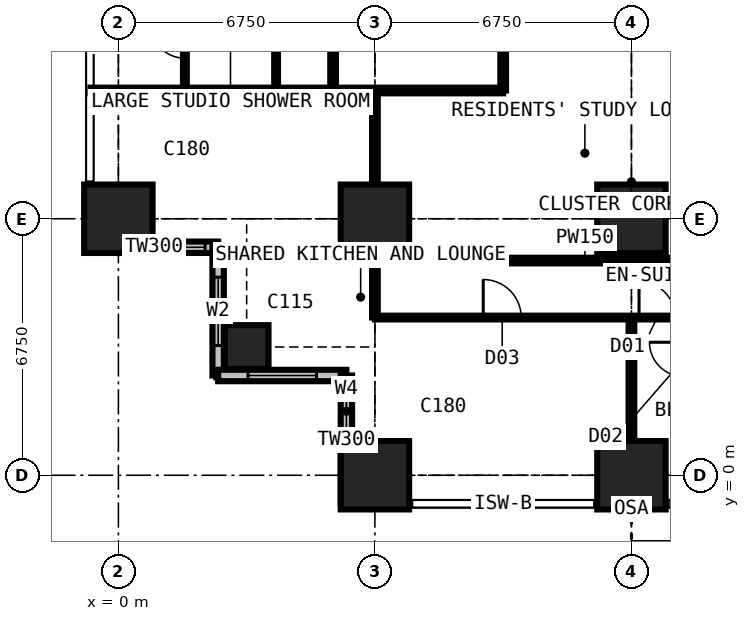
"""IFC4 building model, lengths in metres.
Left out: names, types, materials, properties, quantities, classifications, styles, units other than length and angle.
Written with IfcOpenShell. Run it as: python <this file> out.ifc"""

import sys

from ifc_helpers import new_model, si_unit, direction, frame, frame_2d, origin, origin_2d, place, context, subcontext, project, spatial, rectangle, extrude, element, fill, save


model = new_model("IFC4")
c1 = context("Model", 3, precision=1e-05, world=origin(), true_north=direction((0.0, 1.0)))
c2 = subcontext(c1, "Body", "Model", "MODEL_VIEW")
j1 = project(units=[si_unit("LENGTHUNIT", "METRE"), si_unit("PLANEANGLEUNIT", "RADIAN")], contexts=[c1])
p1 = place(None, origin())
s1 = spatial("IfcSite", under=j1, at=p1, CompositionType="ELEMENT")
p2 = place(p1, origin())
s2 = spatial("IfcBuilding", under=s1, at=p2, CompositionType="ELEMENT")
p3 = place(p2, frame((0.0, 0.0, 90.9)))
s3 = spatial("IfcBuildingStorey", under=s2, at=p3, CompositionType="ELEMENT", Elevation=90.9)
p4 = place(p3, frame((0.0, 6.75, 0.0), z_axis=(0.0, 0.0, 1.0), x_axis=(1.0, 0.0, 0.0)))
e1 = element("IfcColumn", 1, at=p4, inside=s3, PredefinedType="COLUMN", context=c2, shape_type="SweptSolid", body=[
    extrude(rectangle(XDim=1.8, YDim=1.8, at=origin_2d()), origin(), (0.0, 0.0, 1.0), 3.6),
])
p5 = place(p3, frame((3.375, 3.375, 0.0), z_axis=(0.0, 0.0, 1.0), x_axis=(1.0, 0.0, 0.0)))
e2 = element("IfcColumn", 2, at=p5, inside=s3, PredefinedType="COLUMN", context=c2, shape_type="SweptSolid", body=[
    extrude(rectangle(XDim=1.15, YDim=1.15, at=origin_2d()), origin(), (0.0, 0.0, 1.0), 3.6),
])
for number, where, z_axis, x_axis in (
    (3, (6.75, 0.0, 0.0), (0.0, 0.0, 1.0), (1.0, 0.0, 0.0)),
    (4, (6.75, 6.75, 0.0), (0.0, 0.0, 1.0), (1.0, 0.0, 0.0)),
    (5, (13.5, 0.0, 0.0), (0.0, 0.0, 1.0), (1.0, 0.0, 0.0)),
    (6, (13.5, 6.75, 0.0), (0.0, 0.0, 1.0), (1.0, 0.0, 0.0)),
):
    element("IfcColumn", number, at=place(p3, frame(where, z_axis=z_axis, x_axis=x_axis)), inside=s3, PredefinedType="COLUMN", context=c2, shape_type="SweptSolid", body=[
        extrude(rectangle(XDim=1.8, YDim=1.8, at=origin_2d()), origin(), (0.0, 0.0, 1.0), 3.6),
    ])
p6 = place(p3, frame((-0.75, 6.0, 0.0), z_axis=(0.0, 0.0, 1.0), x_axis=(1.0, 0.0, 0.0)))
e7 = element("IfcWall", 7, at=p6, inside=s3, PredefinedType="SOLIDWALL", context=c2, shape_type="SweptSolid", body=[
    extrude(rectangle(XDim=3.375, YDim=0.3, at=frame_2d((1.688, 0.0))), origin(), (0.0, 0.0, 1.0), 3.375),
])
p7 = place(p6, frame((1.833, 0.0, 0.9)))
e8 = element("IfcOpeningElement", 8, at=p7, cuts=e7, PredefinedType="OPENING", context=c2, shape_type="SweptSolid", body=[
    extrude(rectangle(XDim=1.2, YDim=1.8, at=frame_2d((0.6, 0.9))), frame((0.0, 0.16, 0.0), z_axis=(0.0, -1.0, 0.0), x_axis=(1.0, 0.0, 0.0)), (0.0, 0.0, 1.0), 0.32),
])
p8 = place(p3, frame((2.625, 6.0, 0.0), z_axis=(0.0, 0.0, 1.0), x_axis=(0.0, -1.0, 0.0)))
e9 = element("IfcWall", 9, at=p8, inside=s3, PredefinedType="SOLIDWALL", context=c2, shape_type="SweptSolid", body=[
    extrude(rectangle(XDim=3.375, YDim=0.3, at=frame_2d((1.688, 0.0))), origin(), (0.0, 0.0, 1.0), 3.375),
])
p9 = place(p8, frame((0.788, 0.0, 0.6)))
e10 = element("IfcOpeningElement", 10, at=p9, cuts=e9, PredefinedType="OPENING", context=c2, shape_type="SweptSolid", body=[
    extrude(rectangle(XDim=1.8, YDim=2.1, at=frame_2d((0.9, 1.05))), frame((0.0, 0.16, 0.0), z_axis=(0.0, -1.0, 0.0), x_axis=(1.0, 0.0, 0.0)), (0.0, 0.0, 1.0), 0.32),
])
p10 = place(p3, frame((2.625, 2.625, 0.0), z_axis=(0.0, 0.0, 1.0), x_axis=(1.0, 0.0, 0.0)))
e11 = element("IfcWall", 11, at=p10, inside=s3, PredefinedType="SOLIDWALL", context=c2, shape_type="SweptSolid", body=[
    extrude(rectangle(XDim=3.375, YDim=0.3, at=frame_2d((1.688, 0.0))), origin(), (0.0, 0.0, 1.0), 3.375),
])
p11 = place(p10, frame((0.788, 0.0, 0.6)))
e12 = element("IfcOpeningElement", 12, at=p11, cuts=e11, PredefinedType="OPENING", context=c2, shape_type="SweptSolid", body=[
    extrude(rectangle(XDim=1.8, YDim=2.1, at=frame_2d((0.9, 1.05))), frame((0.0, 0.16, 0.0), z_axis=(0.0, -1.0, 0.0), x_axis=(1.0, 0.0, 0.0)), (0.0, 0.0, 1.0), 0.32),
])
p12 = place(p3, frame((6.0, 2.625, 0.0), z_axis=(0.0, 0.0, 1.0), x_axis=(0.0, -1.0, 0.0)))
e13 = element("IfcWall", 13, at=p12, inside=s3, PredefinedType="SOLIDWALL", context=c2, shape_type="SweptSolid", body=[
    extrude(rectangle(XDim=3.375, YDim=0.3, at=frame_2d((1.688, 0.0))), origin(), (0.0, 0.0, 1.0), 3.375),
])
p13 = place(p12, frame((0.343, 0.0, 0.9)))
e14 = element("IfcOpeningElement", 14, at=p13, cuts=e13, PredefinedType="OPENING", context=c2, shape_type="SweptSolid", body=[
    extrude(rectangle(XDim=1.2, YDim=1.8, at=frame_2d((0.6, 0.9))), frame((0.0, 0.16, 0.0), z_axis=(0.0, -1.0, 0.0), x_axis=(1.0, 0.0, 0.0)), (0.0, 0.0, 1.0), 0.32),
])
p14 = place(p3, frame((-0.734, 10.125, 0.0), z_axis=(0.0, 0.0, 1.0), x_axis=(1.0, 0.0, 0.0)))
e15 = element("IfcWall", 15, at=p14, inside=s3, PredefinedType="PARTITIONING", context=c2, shape_type="SweptSolid", body=[
    extrude(rectangle(XDim=10.859, YDim=0.15, at=frame_2d((5.429, 0.0))), origin(), (0.0, 0.0, 1.0), 3.375),
])
p15 = place(p3, frame((1.75, 10.125, 0.0), z_axis=(0.0, 0.0, 1.0), x_axis=(0.0, 1.0, 0.0)))
e16 = element("IfcWall", 16, at=p15, inside=s3, PredefinedType="PARTITIONING", context=c2, shape_type="SweptSolid", body=[
    extrude(rectangle(XDim=2.6, YDim=0.1, at=frame_2d((1.3, 0.0))), origin(), (0.0, 0.0, 1.0), 3.375),
])
p16 = place(p15, frame((0.85, 0.0, 0.0)))
e17 = element("IfcOpeningElement", 17, at=p16, cuts=e16, PredefinedType="OPENING", context=c2, shape_type="SweptSolid", body=[
    extrude(rectangle(XDim=0.9, YDim=2.2, at=frame_2d((0.45, 1.1))), frame((0.0, 0.06, 0.0), z_axis=(0.0, -1.0, 0.0), x_axis=(1.0, 0.0, 0.0)), (0.0, 0.0, 1.0), 0.12),
])
p17 = place(p3, frame((4.15, 10.125, 0.0), z_axis=(0.0, 0.0, 1.0), x_axis=(0.0, 1.0, 0.0)))
e18 = element("IfcWall", 18, at=p17, inside=s3, PredefinedType="PARTITIONING", context=c2, shape_type="SweptSolid", body=[
    extrude(rectangle(XDim=16.875, YDim=0.1, at=frame_2d((8.438, 0.0))), origin(), (0.0, 0.0, 1.0), 3.375),
])
p18 = place(p17, frame((4.2, 0.0, 0.0)))
e19 = element("IfcOpeningElement", 19, at=p18, cuts=e18, PredefinedType="OPENING", context=c2, shape_type="SweptSolid", body=[
    extrude(rectangle(XDim=0.95, YDim=2.2, at=frame_2d((0.475, 1.1))), frame((0.0, 0.06, 0.0), z_axis=(0.0, -1.0, 0.0), x_axis=(1.0, 0.0, 0.0)), (0.0, 0.0, 1.0), 0.12),
])
p19 = place(p17, frame((10.95, 0.0, 0.0)))
e20 = element("IfcOpeningElement", 20, at=p19, cuts=e18, PredefinedType="OPENING", context=c2, shape_type="SweptSolid", body=[
    extrude(rectangle(XDim=0.95, YDim=2.2, at=frame_2d((0.475, 1.1))), frame((0.0, 0.06, 0.0), z_axis=(0.0, -1.0, 0.0), x_axis=(1.0, 0.0, 0.0)), (0.0, 0.0, 1.0), 0.12),
])
p20 = place(p3, frame((5.65, 10.125, 0.0), z_axis=(0.0, 0.0, 1.0), x_axis=(0.0, 1.0, 0.0)))
e21 = element("IfcWall", 21, at=p20, inside=s3, PredefinedType="PARTITIONING", context=c2, shape_type="SweptSolid", body=[
    extrude(rectangle(XDim=10.762, YDim=0.15, at=frame_2d((5.381, 0.0))), origin(), (0.0, 0.0, 1.0), 3.375),
])
p21 = place(p20, frame((4.9, 0.0, 0.0)))
e22 = element("IfcOpeningElement", 22, at=p21, cuts=e21, PredefinedType="OPENING", context=c2, shape_type="SweptSolid", body=[
    extrude(rectangle(XDim=0.95, YDim=2.2, at=frame_2d((0.475, 1.1))), frame((0.0, 0.085, 0.0), z_axis=(0.0, -1.0, 0.0), x_axis=(1.0, 0.0, 0.0)), (0.0, 0.0, 1.0), 0.17),
])
p22 = place(p3, frame((6.75, 4.15, 0.0), z_axis=(0.0, 0.0, 1.0), x_axis=(0.0, 1.0, 0.0)))
e23 = element("IfcWall", 23, at=p22, inside=s3, PredefinedType="PARTITIONING", context=c2, shape_type="SweptSolid", body=[
    extrude(rectangle(XDim=5.975, YDim=0.15, at=frame_2d((2.988, 0.0))), origin(), (0.0, 0.0, 1.0), 2.877),
])
p23 = place(p3, frame((6.75, 4.15, 0.0), z_axis=(0.0, 0.0, 1.0), x_axis=(1.0, 0.0, 0.0)))
e24 = element("IfcWall", 24, at=p23, inside=s3, PredefinedType="PARTITIONING", context=c2, shape_type="SweptSolid", body=[
    extrude(rectangle(XDim=23.625, YDim=0.1, at=frame_2d((11.812, 0.0))), origin(), (0.0, 0.0, 1.0), 3.375),
])
p24 = place(p23, frame((2.85, 0.0, 0.0)))
e25 = element("IfcOpeningElement", 25, at=p24, cuts=e24, PredefinedType="OPENING", context=c2, shape_type="SweptSolid", body=[
    extrude(rectangle(XDim=1.0, YDim=2.2, at=frame_2d((0.5, 1.1))), frame((0.0, 0.06, 0.0), z_axis=(0.0, -1.0, 0.0), x_axis=(1.0, 0.0, 0.0)), (0.0, 0.0, 1.0), 0.12),
])
p25 = place(p23, frame((6.95, 0.0, 0.0)))
e26 = element("IfcOpeningElement", 26, at=p25, cuts=e24, PredefinedType="OPENING", context=c2, shape_type="SweptSolid", body=[
    extrude(rectangle(XDim=0.95, YDim=2.2, at=frame_2d((0.475, 1.1))), frame((0.0, 0.06, 0.0), z_axis=(0.0, -1.0, 0.0), x_axis=(1.0, 0.0, 0.0)), (0.0, 0.0, 1.0), 0.12),
])
p26 = place(p23, frame((10.375, 0.0, 0.0)))
e27 = element("IfcOpeningElement", 27, at=p26, cuts=e24, PredefinedType="OPENING", context=c2, shape_type="SweptSolid", body=[
    extrude(rectangle(XDim=0.95, YDim=2.2, at=frame_2d((0.475, 1.1))), frame((0.0, 0.06, 0.0), z_axis=(0.0, -1.0, 0.0), x_axis=(1.0, 0.0, 0.0)), (0.0, 0.0, 1.0), 0.12),
])
p27 = place(p23, frame((13.7, 0.0, 0.0)))
e28 = element("IfcOpeningElement", 28, at=p27, cuts=e24, PredefinedType="OPENING", context=c2, shape_type="SweptSolid", body=[
    extrude(rectangle(XDim=0.95, YDim=2.2, at=frame_2d((0.475, 1.1))), frame((0.0, 0.06, 0.0), z_axis=(0.0, -1.0, 0.0), x_axis=(1.0, 0.0, 0.0)), (0.0, 0.0, 1.0), 0.12),
])
p28 = place(p23, frame((17.125, 0.0, 0.0)))
e29 = element("IfcOpeningElement", 29, at=p28, cuts=e24, PredefinedType="OPENING", context=c2, shape_type="SweptSolid", body=[
    extrude(rectangle(XDim=0.95, YDim=2.2, at=frame_2d((0.475, 1.1))), frame((0.0, 0.06, 0.0), z_axis=(0.0, -1.0, 0.0), x_axis=(1.0, 0.0, 0.0)), (0.0, 0.0, 1.0), 0.12),
])
p29 = place(p23, frame((20.5, 0.0, 0.0)))
e30 = element("IfcOpeningElement", 30, at=p29, cuts=e24, PredefinedType="OPENING", context=c2, shape_type="SweptSolid", body=[
    extrude(rectangle(XDim=0.95, YDim=2.2, at=frame_2d((0.475, 1.1))), frame((0.0, 0.06, 0.0), z_axis=(0.0, -1.0, 0.0), x_axis=(1.0, 0.0, 0.0)), (0.0, 0.0, 1.0), 0.12),
])
p30 = place(p3, frame((6.75, 5.65, 0.0), z_axis=(0.0, 0.0, 1.0), x_axis=(1.0, 0.0, 0.0)))
e31 = element("IfcWall", 31, at=p30, inside=s3, PredefinedType="PARTITIONING", context=c2, shape_type="SweptSolid", body=[
    extrude(rectangle(XDim=11.05, YDim=0.15, at=frame_2d((5.525, 0.0))), origin(), (0.0, 0.0, 1.0), 3.375),
])
p31 = place(p3, frame((10.125, 10.125, 0.0), z_axis=(0.0, 0.0, 1.0), x_axis=(0.0, 1.0, 0.0)))
e32 = element("IfcWall", 32, at=p31, inside=s3, PredefinedType="PARTITIONING", context=c2, shape_type="SweptSolid", body=[
    extrude(rectangle(XDim=1.175, YDim=0.15, at=frame_2d((0.587, 0.0))), origin(), (0.0, 0.0, 1.0), 3.375),
])
p32 = place(p3, frame((13.5, -0.734, 0.0), z_axis=(0.0, 0.0, 1.0), x_axis=(0.0, 1.0, 0.0)))
e33 = element("IfcWall", 33, at=p32, inside=s3, PredefinedType="PARTITIONING", context=c2, shape_type="SweptSolid", body=[
    extrude(rectangle(XDim=4.884, YDim=0.15, at=frame_2d((2.442, 0.0))), origin(), (0.0, 0.0, 1.0), 2.61),
])
p33 = place(p7, origin())
e34 = element("IfcWindow", 34, at=p33, inside=s3, PartitioningType="SINGLE_PANEL", PredefinedType="WINDOW", context=c2, shape_type="SweptSolid", body=[
    extrude(rectangle(XDim=1.2, YDim=1.8, at=frame_2d((0.6, 0.9))), frame((0.0, 0.03, 0.0), z_axis=(0.0, -1.0, 0.0), x_axis=(1.0, 0.0, 0.0)), (0.0, 0.0, 1.0), 0.06),
])
fill(e8, e34)
p34 = place(p9, origin())
e35 = element("IfcWindow", 35, at=p34, inside=s3, PartitioningType="SINGLE_PANEL", PredefinedType="WINDOW", context=c2, shape_type="SweptSolid", body=[
    extrude(rectangle(XDim=1.8, YDim=2.1, at=frame_2d((0.9, 1.05))), frame((0.0, 0.03, 0.0), z_axis=(0.0, -1.0, 0.0), x_axis=(1.0, 0.0, 0.0)), (0.0, 0.0, 1.0), 0.06),
])
fill(e10, e35)
p35 = place(p11, origin())
e36 = element("IfcWindow", 36, at=p35, inside=s3, PartitioningType="SINGLE_PANEL", PredefinedType="WINDOW", context=c2, shape_type="SweptSolid", body=[
    extrude(rectangle(XDim=1.8, YDim=2.1, at=frame_2d((0.9, 1.05))), frame((0.0, 0.03, 0.0), z_axis=(0.0, -1.0, 0.0), x_axis=(1.0, 0.0, 0.0)), (0.0, 0.0, 1.0), 0.06),
])
fill(e12, e36)
p36 = place(p13, origin())
e37 = element("IfcWindow", 37, at=p36, inside=s3, PartitioningType="SINGLE_PANEL", PredefinedType="WINDOW", context=c2, shape_type="SweptSolid", body=[
    extrude(rectangle(XDim=1.2, YDim=1.8, at=frame_2d((0.6, 0.9))), frame((0.0, 0.03, 0.0), z_axis=(0.0, -1.0, 0.0), x_axis=(1.0, 0.0, 0.0)), (0.0, 0.0, 1.0), 0.06),
])
fill(e14, e37)
p37 = place(p24, origin())
e38 = element("IfcDoor", 38, at=p37, inside=s3, OperationType="SINGLE_SWING_LEFT", PredefinedType="DOOR", context=c2, shape_type="SweptSolid", body=[
    extrude(rectangle(XDim=1.0, YDim=2.2, at=frame_2d((0.5, 1.1))), frame((0.0, 0.025, 0.0), z_axis=(0.0, -1.0, 0.0), x_axis=(1.0, 0.0, 0.0)), (0.0, 0.0, 1.0), 0.05),
])
fill(e25, e38)
p38 = place(p25, origin())
e39 = element("IfcDoor", 39, at=p38, inside=s3, OperationType="SINGLE_SWING_LEFT", PredefinedType="DOOR", context=c2, shape_type="SweptSolid", body=[
    extrude(rectangle(XDim=0.95, YDim=2.2, at=frame_2d((0.475, 1.1))), frame((0.0, 0.025, 0.0), z_axis=(0.0, -1.0, 0.0), x_axis=(1.0, 0.0, 0.0)), (0.0, 0.0, 1.0), 0.05),
])
fill(e26, e39)
p39 = place(p16, origin())
e40 = element("IfcDoor", 40, at=p39, inside=s3, OperationType="SINGLE_SWING_RIGHT", PredefinedType="DOOR", context=c2, shape_type="SweptSolid", body=[
    extrude(rectangle(XDim=0.9, YDim=2.2, at=frame_2d((0.45, 1.1))), frame((0.0, 0.025, 0.0), z_axis=(0.0, -1.0, 0.0), x_axis=(1.0, 0.0, 0.0)), (0.0, 0.0, 1.0), 0.05),
])
fill(e17, e40)
save(model, sys.argv[1])
